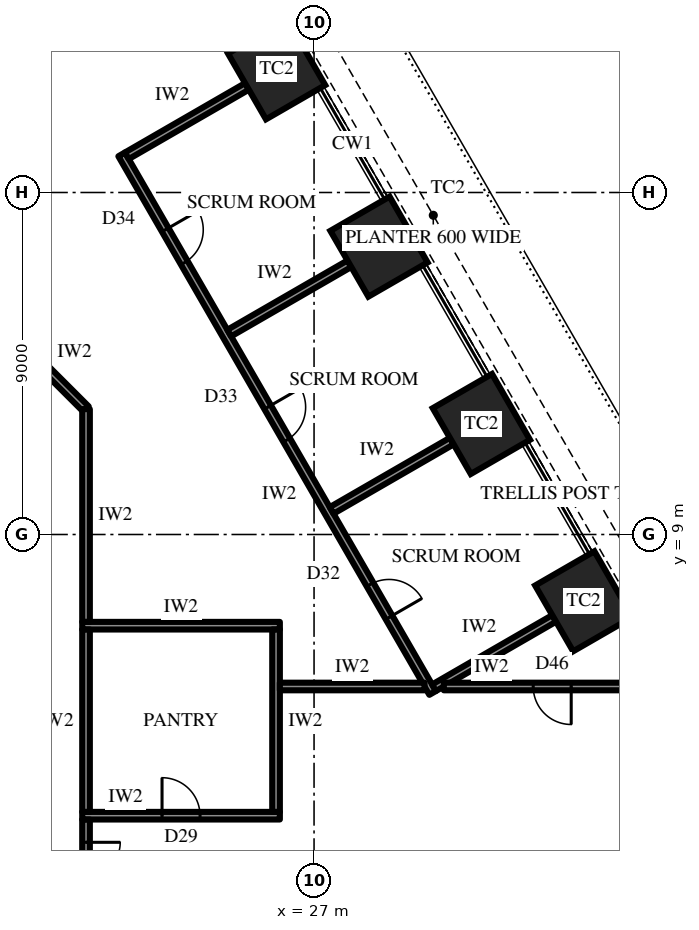
"""IFC4 building model, lengths in metres.
Left out: names, types, materials, properties, quantities, classifications, styles, units other than length and angle.
Written with IfcOpenShell. Run it as: python <this file> out.ifc"""

import sys

from ifc_helpers import new_model, si_unit, direction, frame, frame_2d, origin, origin_2d, place, context, subcontext, project, spatial, rectangle, extrude, element, fill, save


model = new_model("IFC4")
c1 = context("Model", 3, precision=1e-05, world=origin(), true_north=direction((0.0, 1.0)))
c2 = subcontext(c1, "Body", "Model", "MODEL_VIEW")
j1 = project(units=[si_unit("LENGTHUNIT", "METRE"), si_unit("PLANEANGLEUNIT", "RADIAN")], contexts=[c1])
p1 = place(None, origin())
s1 = spatial("IfcSite", under=j1, at=p1, CompositionType="ELEMENT")
p2 = place(p1, origin())
s2 = spatial("IfcBuilding", under=s1, at=p2, CompositionType="ELEMENT")
p3 = place(p2, frame((0.0, 0.0, 44.5)))
s3 = spatial("IfcBuildingStorey", under=s2, at=p3, CompositionType="ELEMENT", Elevation=44.5)
for number, where, z_axis, x_axis in (
    (1, (34.097, 7.242, 0.0), (0.0, 0.0, 1.0), (-0.5, 0.866, 0.0)),
    (2, (31.403, 11.908, 0.0), (0.0, 0.0, 1.0), (-0.5, 0.866, 0.0)),
    (3, (28.709, 16.575, 0.0), (0.0, 0.0, 1.0), (-0.5, 0.866, 0.0)),
    (4, (26.014, 21.242, 0.0), (0.0, 0.0, 1.0), (-0.5, 0.866, 0.0)),
):
    element("IfcColumn", number, at=place(p3, frame(where, z_axis=z_axis, x_axis=x_axis)), inside=s3, PredefinedType="COLUMN", context=c2, shape_type="SweptSolid", body=[
        extrude(rectangle(XDim=2.0, YDim=1.8, at=origin_2d()), origin(), (0.0, 0.0, 1.0), 4.2),
    ])
p4 = place(p3, frame((30.12, 4.83, 0.0), z_axis=(0.0, 0.0, 1.0), x_axis=(-0.500000949028, 0.866024855862, 0.0)))
e5 = element("IfcWall", 5, at=p4, inside=s3, PredefinedType="PARTITIONING", context=c2, shape_type="SweptSolid", body=[
    extrude(rectangle(XDim=16.366, YDim=0.2, at=frame_2d((8.183, 0.0))), origin(), (0.0, 0.0, 1.0), 4.0),
])
p5 = place(p4, frame((2.294, 0.0, 0.0)))
e6 = element("IfcOpeningElement", 6, at=p5, cuts=e5, PredefinedType="OPENING", context=c2, shape_type="SweptSolid", body=[
    extrude(rectangle(XDim=1.0, YDim=2.2, at=frame_2d((0.5, 1.1))), frame((0.0, 0.11, 0.0), z_axis=(0.0, -1.0, 0.0), x_axis=(1.0, 0.0, 0.0)), (0.0, 0.0, 1.0), 0.22),
])
p6 = place(p4, frame((7.683, 0.0, 0.0)))
e7 = element("IfcOpeningElement", 7, at=p6, cuts=e5, PredefinedType="OPENING", context=c2, shape_type="SweptSolid", body=[
    extrude(rectangle(XDim=1.0, YDim=2.2, at=frame_2d((0.5, 1.1))), frame((0.0, 0.11, 0.0), z_axis=(0.0, -1.0, 0.0), x_axis=(1.0, 0.0, 0.0)), (0.0, 0.0, 1.0), 0.22),
])
p7 = place(p4, frame((13.072, 0.0, 0.0)))
e8 = element("IfcOpeningElement", 8, at=p7, cuts=e5, PredefinedType="OPENING", context=c2, shape_type="SweptSolid", body=[
    extrude(rectangle(XDim=1.0, YDim=2.2, at=frame_2d((0.5, 1.1))), frame((0.0, 0.11, 0.0), z_axis=(0.0, -1.0, 0.0), x_axis=(1.0, 0.0, 0.0)), (0.0, 0.0, 1.0), 0.22),
])
for number, where, z_axis, x_axis in (
    (9, (30.157, 4.967, 0.0), (0.0, 0.0, 1.0), (0.866, 0.5, 0.0)),
    (10, (27.463, 9.633, 0.0), (0.0, 0.0, 1.0), (0.866, 0.5, 0.0)),
):
    element("IfcWall", number, at=place(p3, frame(where, z_axis=z_axis, x_axis=x_axis)), inside=s3, PredefinedType="PARTITIONING", context=c2, shape_type="SweptSolid", body=[
        extrude(rectangle(XDim=3.65, YDim=0.2, at=frame_2d((1.825, 0.0))), origin(), (0.0, 0.0, 1.0), 2.944),
    ])
p8 = place(p3, frame((24.768, 14.3, 0.0), z_axis=(0.0, 0.0, 1.0), x_axis=(0.866024069551, 0.500002310952, 0.0)))
e11 = element("IfcWall", 11, at=p8, inside=s3, PredefinedType="PARTITIONING", context=c2, shape_type="SweptSolid", body=[
    extrude(rectangle(XDim=3.65, YDim=0.2, at=frame_2d((1.825, 0.0))), origin(), (0.0, 0.0, 1.0), 4.0),
])
p9 = place(p3, frame((22.074, 18.967, 0.0), z_axis=(0.0, 0.0, 1.0), x_axis=(0.866011828767, 0.500023511883, 0.0)))
e12 = element("IfcWall", 12, at=p9, inside=s3, PredefinedType="PARTITIONING", context=c2, shape_type="SweptSolid", body=[
    extrude(rectangle(XDim=3.65, YDim=0.2, at=frame_2d((1.825, 0.0))), origin(), (0.0, 0.0, 1.0), 2.992),
])
p10 = place(p3, frame((20.9, 1.6, 0.0), z_axis=(0.0, 0.0, 1.0), x_axis=(1.0, 0.0, 0.0)))
e13 = element("IfcWall", 13, at=p10, inside=s3, PredefinedType="PARTITIONING", context=c2, shape_type="SweptSolid", body=[
    extrude(rectangle(XDim=5.2, YDim=0.2, at=frame_2d((2.6, 0.0))), origin(), (0.0, 0.0, 1.0), 4.0),
])
p11 = place(p10, frame((2.1, 0.0, 0.0)))
e14 = element("IfcOpeningElement", 14, at=p11, cuts=e13, PredefinedType="OPENING", context=c2, shape_type="SweptSolid", body=[
    extrude(rectangle(XDim=1.0, YDim=2.2, at=frame_2d((0.5, 1.1))), frame((0.0, 0.11, 0.0), z_axis=(0.0, -1.0, 0.0), x_axis=(1.0, 0.0, 0.0)), (0.0, 0.0, 1.0), 0.22),
])
p12 = place(p3, frame((20.9, 6.6, 0.0), z_axis=(0.0, 0.0, 1.0), x_axis=(1.0, 0.0, 0.0)))
e15 = element("IfcWall", 15, at=p12, inside=s3, PredefinedType="PARTITIONING", context=c2, shape_type="SweptSolid", body=[
    extrude(rectangle(XDim=5.2, YDim=0.2, at=frame_2d((2.6, 0.0))), origin(), (0.0, 0.0, 1.0), 4.0),
])
for number, where, z_axis, x_axis in (
    (16, (21.0, 1.7, 0.0), (0.0, 0.0, 1.0), (0.0, 1.0, 0.0)),
    (17, (26.0, 1.7, 0.0), (0.0, 0.0, 1.0), (0.0, 1.0, 0.0)),
):
    element("IfcWall", number, at=place(p3, frame(where, z_axis=z_axis, x_axis=x_axis)), inside=s3, PredefinedType="PARTITIONING", context=c2, shape_type="SweptSolid", body=[
        extrude(rectangle(XDim=4.8, YDim=0.2, at=frame_2d((2.4, 0.0))), origin(), (0.0, 0.0, 1.0), 4.0),
    ])
p13 = place(p3, frame((19.2, 14.1, 0.0), z_axis=(0.0, 0.0, 1.0), x_axis=(0.707106781187, -0.707106781187, 0.0)))
e18 = element("IfcWall", 18, at=p13, inside=s3, PredefinedType="PARTITIONING", context=c2, shape_type="SweptSolid", body=[
    extrude(rectangle(XDim=2.546, YDim=0.2, at=frame_2d((1.273, 0.0))), origin(), (0.0, 0.0, 1.0), 4.0),
])
p14 = place(p3, frame((21.0, 1.499, 0.0), z_axis=(0.0, 0.0, 1.0), x_axis=(0.0, -1.0, 0.0)))
e19 = element("IfcWall", 19, at=p14, inside=s3, PredefinedType="PARTITIONING", context=c2, shape_type="SweptSolid", body=[
    extrude(rectangle(XDim=2.998, YDim=0.2, at=frame_2d((1.499, 0.0))), origin(), (0.0, 0.0, 1.0), 4.0),
])
p15 = place(p14, frame((0.599, 0.0, 0.0)))
e20 = element("IfcOpeningElement", 20, at=p15, cuts=e19, PredefinedType="OPENING", context=c2, shape_type="SweptSolid", body=[
    extrude(rectangle(XDim=1.8, YDim=2.4, at=frame_2d((0.9, 1.2))), frame((0.0, 0.11, 0.0), z_axis=(0.0, -1.0, 0.0), x_axis=(1.0, 0.0, 0.0)), (0.0, 0.0, 1.0), 0.22),
])
p16 = place(p3, frame((21.0, 12.3, 0.0), z_axis=(0.0, 0.0, 1.0), x_axis=(0.0, -1.0, 0.0)))
e21 = element("IfcWall", 21, at=p16, inside=s3, PredefinedType="PARTITIONING", context=c2, shape_type="SweptSolid", body=[
    extrude(rectangle(XDim=5.599, YDim=0.2, at=frame_2d((2.8, 0.0))), origin(), (0.0, 0.0, 1.0), 4.0),
])
p17 = place(p3, frame((26.1, 5.0, 0.0), z_axis=(0.0, 0.0, 1.0), x_axis=(1.0, 0.0, 0.0)))
e22 = element("IfcWall", 22, at=p17, inside=s3, PredefinedType="PARTITIONING", context=c2, shape_type="SweptSolid", body=[
    extrude(rectangle(XDim=3.807, YDim=0.2, at=frame_2d((1.903, 0.0))), origin(), (0.0, 0.0, 1.0), 4.0),
])
p18 = place(p3, frame((30.415, 5.0, 0.0), z_axis=(0.0, 0.0, 1.0), x_axis=(1.0, 0.0, 0.0)))
e23 = element("IfcWall", 23, at=p18, inside=s3, PredefinedType="PARTITIONING", context=c2, shape_type="SweptSolid", body=[
    extrude(rectangle(XDim=5.704, YDim=0.2, at=frame_2d((2.852, 0.0))), origin(), (0.0, 0.0, 1.0), 4.0),
])
p19 = place(p18, frame((2.352, 0.0, 0.0)))
e24 = element("IfcOpeningElement", 24, at=p19, cuts=e23, PredefinedType="OPENING", context=c2, shape_type="SweptSolid", body=[
    extrude(rectangle(XDim=1.0, YDim=2.2, at=frame_2d((0.5, 1.1))), frame((0.0, 0.11, 0.0), z_axis=(0.0, -1.0, 0.0), x_axis=(1.0, 0.0, 0.0)), (0.0, 0.0, 1.0), 0.22),
])
p20 = place(p5, frame((1.0, 0.0, 0.0), z_axis=(0.0, 0.0, 1.0), x_axis=(-1.0, 0.0, 0.0)))
e25 = element("IfcDoor", 25, at=p20, inside=s3, OperationType="SINGLE_SWING_LEFT", PredefinedType="DOOR", context=c2, shape_type="SweptSolid", body=[
    extrude(rectangle(XDim=1.0, YDim=2.2, at=frame_2d((0.5, 1.1))), frame((0.0, 0.025, 0.0), z_axis=(0.0, -1.0, 0.0), x_axis=(1.0, 0.0, 0.0)), (0.0, 0.0, 1.0), 0.05),
])
fill(e6, e25)
p21 = place(p6, frame((1.0, 0.0, 0.0), z_axis=(0.0, 0.0, 1.0), x_axis=(-1.0, 0.0, 0.0)))
e26 = element("IfcDoor", 26, at=p21, inside=s3, OperationType="SINGLE_SWING_RIGHT", PredefinedType="DOOR", context=c2, shape_type="SweptSolid", body=[
    extrude(rectangle(XDim=1.0, YDim=2.2, at=frame_2d((0.5, 1.1))), frame((0.0, 0.025, 0.0), z_axis=(0.0, -1.0, 0.0), x_axis=(1.0, 0.0, 0.0)), (0.0, 0.0, 1.0), 0.05),
])
fill(e7, e26)
p22 = place(p7, frame((1.0, 0.0, 0.0), z_axis=(0.0, 0.0, 1.0), x_axis=(-1.0, 0.0, 0.0)))
e27 = element("IfcDoor", 27, at=p22, inside=s3, OperationType="SINGLE_SWING_RIGHT", PredefinedType="DOOR", context=c2, shape_type="SweptSolid", body=[
    extrude(rectangle(XDim=1.0, YDim=2.2, at=frame_2d((0.5, 1.1))), frame((0.0, 0.025, 0.0), z_axis=(0.0, -1.0, 0.0), x_axis=(1.0, 0.0, 0.0)), (0.0, 0.0, 1.0), 0.05),
])
fill(e8, e27)
p23 = place(p11, origin())
e28 = element("IfcDoor", 28, at=p23, inside=s3, OperationType="SINGLE_SWING_RIGHT", PredefinedType="DOOR", context=c2, shape_type="SweptSolid", body=[
    extrude(rectangle(XDim=1.0, YDim=2.2, at=frame_2d((0.5, 1.1))), frame((0.0, 0.025, 0.0), z_axis=(0.0, -1.0, 0.0), x_axis=(1.0, 0.0, 0.0)), (0.0, 0.0, 1.0), 0.05),
])
fill(e14, e28)
p24 = place(p15, origin())
e29 = element("IfcDoor", 29, at=p24, inside=s3, OperationType="DOUBLE_DOOR_SINGLE_SWING", PredefinedType="DOOR", context=c2, shape_type="SweptSolid", body=[
    extrude(rectangle(XDim=1.8, YDim=2.4, at=frame_2d((0.9, 1.2))), frame((0.0, 0.025, 0.0), z_axis=(0.0, -1.0, 0.0), x_axis=(1.0, 0.0, 0.0)), (0.0, 0.0, 1.0), 0.05),
])
fill(e20, e29)
p25 = place(p19, frame((1.0, 0.0, 0.0), z_axis=(0.0, 0.0, 1.0), x_axis=(-1.0, 0.0, 0.0)))
e30 = element("IfcDoor", 30, at=p25, inside=s3, OperationType="SINGLE_SWING_RIGHT", PredefinedType="DOOR", context=c2, shape_type="SweptSolid", body=[
    extrude(rectangle(XDim=1.0, YDim=2.2, at=frame_2d((0.5, 1.1))), frame((0.0, 0.025, 0.0), z_axis=(0.0, -1.0, 0.0), x_axis=(1.0, 0.0, 0.0)), (0.0, 0.0, 1.0), 0.05),
])
fill(e24, e30)
save(model, sys.argv[1])
